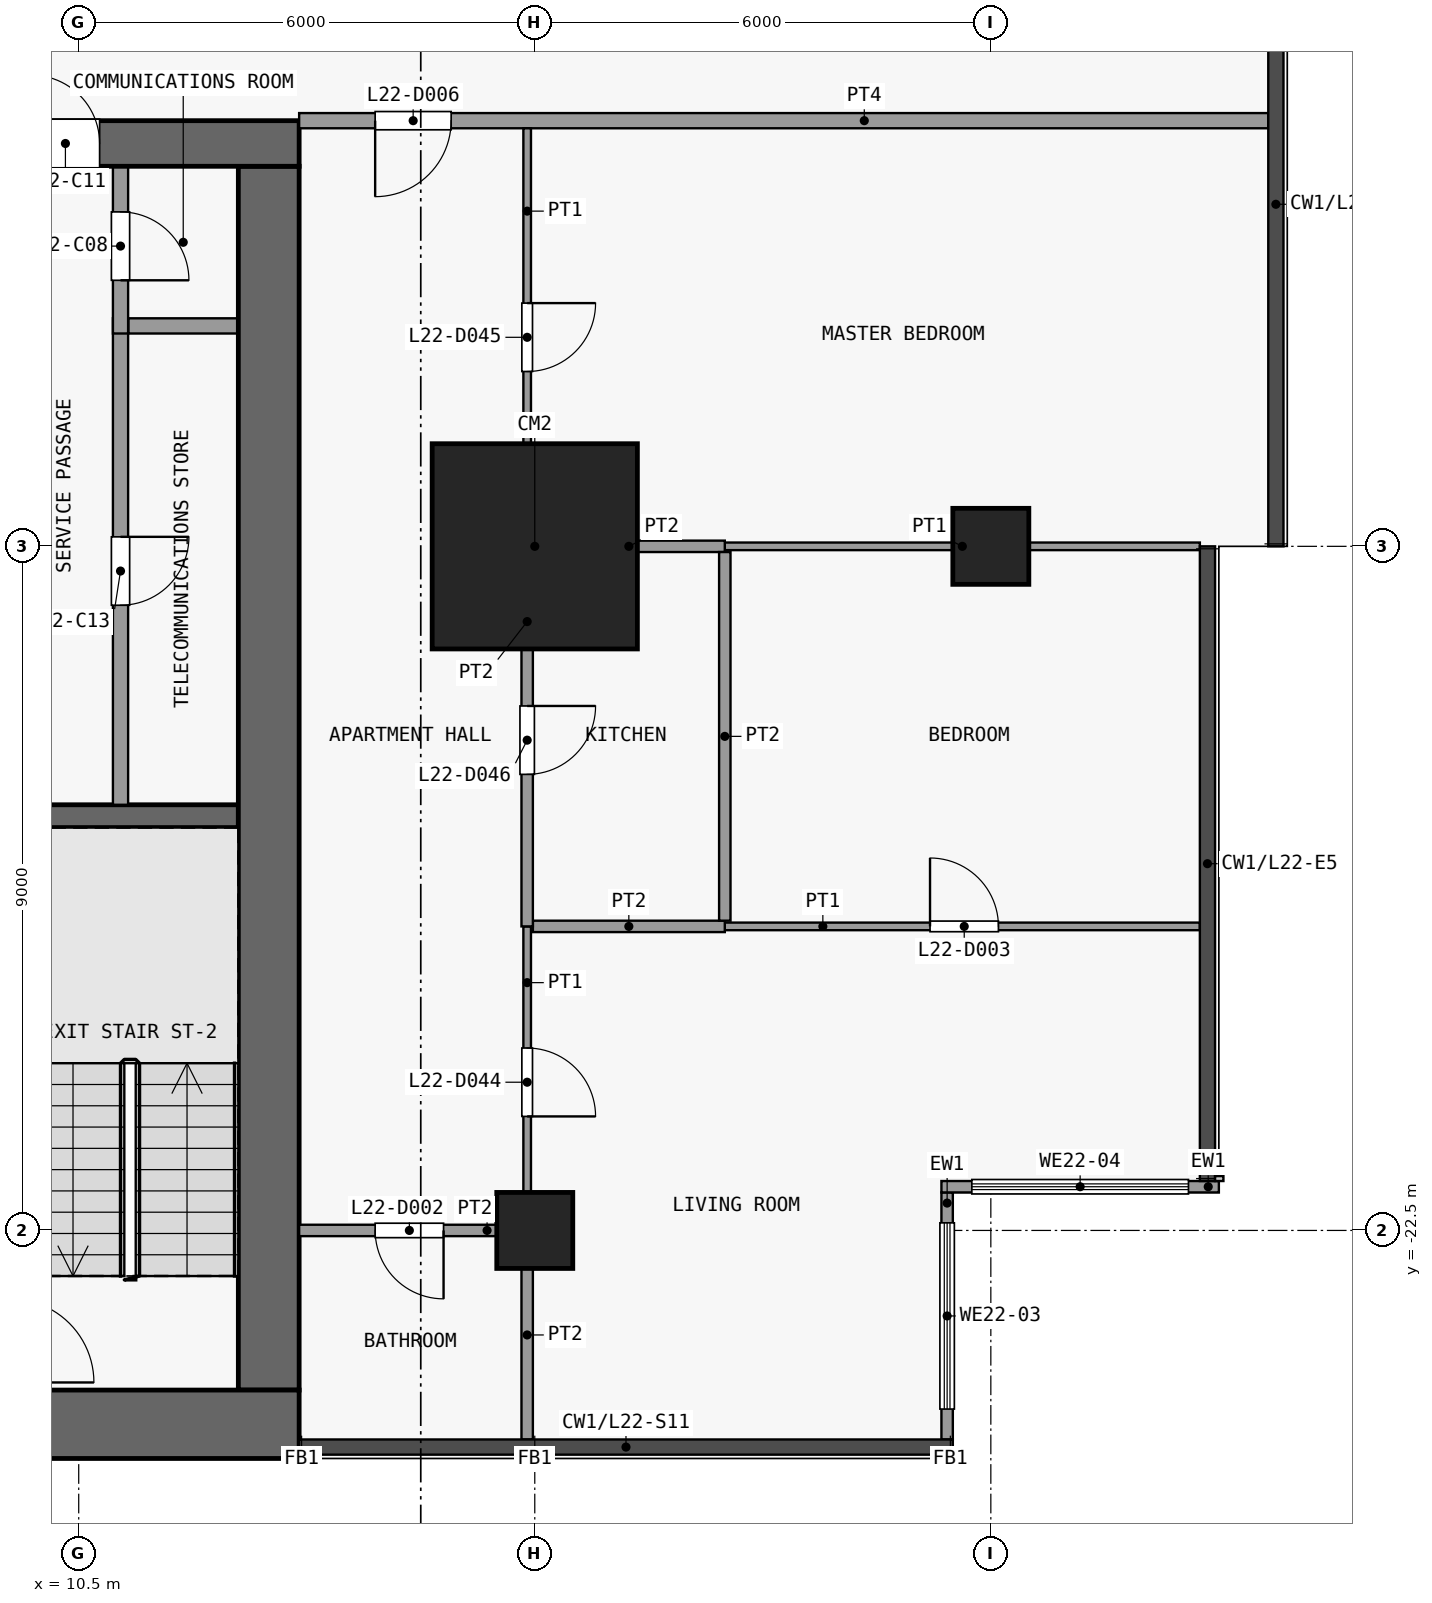
"""IFC4 building model, lengths in metres.
Left out: names, types, materials, properties, quantities, classifications, styles, units other than length and angle.
Written with IfcOpenShell. Run it as: python <this file> out.ifc"""

import sys

from ifc_helpers import new_model, si_unit, direction, frame, frame_2d, origin, origin_2d, place, context, subcontext, project, spatial, rectangle, extrude, element, fill, save


model = new_model("IFC4")
c1 = context("Model", 3, precision=1e-05, world=origin(), true_north=direction((0.0, 1.0)))
c2 = subcontext(c1, "Body", "Model", "MODEL_VIEW")
j1 = project(units=[si_unit("LENGTHUNIT", "METRE"), si_unit("PLANEANGLEUNIT", "RADIAN")], contexts=[c1])
p1 = place(None, origin())
s1 = spatial("IfcSite", under=j1, at=p1, CompositionType="ELEMENT")
p2 = place(p1, origin())
s2 = spatial("IfcBuilding", under=s1, at=p2, CompositionType="ELEMENT")
p3 = place(p2, frame((0.0, 0.0, 91.9)))
s3 = spatial("IfcBuildingStorey", under=s2, at=p3, CompositionType="ELEMENT", Elevation=91.9)
p4 = place(p3, frame((16.5, -22.5, 0.0), z_axis=(0.0, 0.0, 1.0), x_axis=(1.0, 0.0, 0.0)))
e1 = element("IfcColumn", 1, at=p4, inside=s3, PredefinedType="COLUMN", context=c2, shape_type="SweptSolid", body=[
    extrude(rectangle(XDim=1.0, YDim=1.0, at=origin_2d()), origin(), (0.0, 0.0, 1.0), 3.6),
])
p5 = place(p3, frame((16.5, -13.5, 0.0), z_axis=(0.0, 0.0, 1.0), x_axis=(1.0, 0.0, 0.0)))
e2 = element("IfcColumn", 2, at=p5, inside=s3, PredefinedType="COLUMN", context=c2, shape_type="SweptSolid", body=[
    extrude(rectangle(XDim=2.7, YDim=2.7, at=origin_2d()), origin(), (0.0, 0.0, 1.0), 3.6),
])
p6 = place(p3, frame((22.5, -13.5, 0.0), z_axis=(0.0, 0.0, 1.0), x_axis=(1.0, 0.0, 0.0)))
e3 = element("IfcColumn", 3, at=p6, inside=s3, PredefinedType="COLUMN", context=c2, shape_type="SweptSolid", body=[
    extrude(rectangle(XDim=1.0, YDim=1.0, at=origin_2d()), origin(), (0.0, 0.0, 1.0), 3.6),
])
p7 = place(p3, frame((-13.4, -25.05, 0.0), z_axis=(0.0, 0.0, 1.0), x_axis=(1.0, 0.0, 0.0)))
e4 = element("IfcWall", 4, at=p7, inside=s3, PredefinedType="SHEAR", context=c2, shape_type="SweptSolid", body=[
    extrude(rectangle(XDim=26.8, YDim=0.9, at=frame_2d((13.4, 0.0))), origin(), (0.0, 0.0, 1.0), 3.3),
])
p8 = place(p3, frame((-13.4, -8.2, 0.0), z_axis=(0.0, 0.0, 1.0), x_axis=(1.0, 0.0, 0.0)))
e5 = element("IfcWall", 5, at=p8, inside=s3, PredefinedType="SHEAR", context=c2, shape_type="SweptSolid", body=[
    extrude(rectangle(XDim=26.8, YDim=0.6, at=frame_2d((13.4, 0.0))), origin(), (0.0, 0.0, 1.0), 3.3),
])
p9 = place(p8, frame((7.7, 0.0, 0.0)))
e6 = element("IfcOpeningElement", 6, at=p9, cuts=e5, PredefinedType="OPENING", context=c2, shape_type="SweptSolid", body=[
    extrude(rectangle(XDim=1.8, YDim=2.1, at=frame_2d((0.9, 1.05))), frame((0.0, 0.31, 0.0), z_axis=(0.0, -1.0, 0.0), x_axis=(1.0, 0.0, 0.0)), (0.0, 0.0, 1.0), 0.62),
])
p10 = place(p8, frame((17.3, 0.0, 0.0)))
e7 = element("IfcOpeningElement", 7, at=p10, cuts=e5, PredefinedType="OPENING", context=c2, shape_type="SweptSolid", body=[
    extrude(rectangle(XDim=1.8, YDim=2.1, at=frame_2d((0.9, 1.05))), frame((0.0, 0.31, 0.0), z_axis=(0.0, -1.0, 0.0), x_axis=(1.0, 0.0, 0.0)), (0.0, 0.0, 1.0), 0.62),
])
p11 = place(p8, frame((2.625, 0.0, 0.0)))
e8 = element("IfcOpeningElement", 8, at=p11, cuts=e5, PredefinedType="OPENING", context=c2, shape_type="SweptSolid", body=[
    extrude(rectangle(XDim=0.9, YDim=2.1, at=frame_2d((0.45, 1.05))), frame((0.0, 0.31, 0.0), z_axis=(0.0, -1.0, 0.0), x_axis=(1.0, 0.0, 0.0)), (0.0, 0.0, 1.0), 0.62),
])
p12 = place(p8, frame((23.275, 0.0, 0.0)))
e9 = element("IfcOpeningElement", 9, at=p12, cuts=e5, PredefinedType="OPENING", context=c2, shape_type="SweptSolid", body=[
    extrude(rectangle(XDim=0.9, YDim=2.1, at=frame_2d((0.45, 1.05))), frame((0.0, 0.31, 0.0), z_axis=(0.0, -1.0, 0.0), x_axis=(1.0, 0.0, 0.0)), (0.0, 0.0, 1.0), 0.62),
])
p13 = place(p3, frame((13.0, -24.6, 0.0), z_axis=(0.0, 0.0, 1.0), x_axis=(0.0, 1.0, 0.0)))
e10 = element("IfcWall", 10, at=p13, inside=s3, PredefinedType="SHEAR", context=c2, shape_type="SweptSolid", body=[
    extrude(rectangle(XDim=16.1, YDim=0.8, at=frame_2d((8.05, 0.0))), origin(), (0.0, 0.0, 1.0), 3.3),
])
p14 = place(p3, frame((9.5, -17.05, 0.0), z_axis=(0.0, 0.0, 1.0), x_axis=(1.0, 0.0, 0.0)))
e11 = element("IfcWall", 11, at=p14, inside=s3, PredefinedType="SHEAR", context=c2, shape_type="SweptSolid", body=[
    extrude(rectangle(XDim=3.1, YDim=0.3, at=frame_2d((1.55, 0.0))), origin(), (0.0, 0.0, 1.0), 3.3),
])
p15 = place(p3, frame((11.15, -10.6, 0.0), z_axis=(0.0, 0.0, 1.0), x_axis=(1.0, 0.0, 0.0)))
e12 = element("IfcWall", 12, at=p15, inside=s3, PredefinedType="PARTITIONING", context=c2, shape_type="SweptSolid", body=[
    extrude(rectangle(XDim=1.45, YDim=0.2, at=frame_2d((0.725, 0.0))), origin(), (0.0, 0.0, 1.0), 3.3),
])
p16 = place(p3, frame((11.05, -10.5, 0.0), z_axis=(0.0, 0.0, 1.0), x_axis=(0.0, -1.0, 0.0)))
e13 = element("IfcWall", 13, at=p16, inside=s3, PredefinedType="PARTITIONING", context=c2, shape_type="SweptSolid", body=[
    extrude(rectangle(XDim=6.4, YDim=0.2, at=frame_2d((3.2, 0.0))), origin(), (0.0, 0.0, 1.0), 3.3),
])
p17 = place(p16, frame((2.875, 0.0, 0.0)))
e14 = element("IfcOpeningElement", 14, at=p17, cuts=e13, PredefinedType="OPENING", context=c2, shape_type="SweptSolid", body=[
    extrude(rectangle(XDim=0.9, YDim=2.1, at=frame_2d((0.45, 1.05))), frame((0.0, 0.11, 0.0), z_axis=(0.0, -1.0, 0.0), x_axis=(1.0, 0.0, 0.0)), (0.0, 0.0, 1.0), 0.22),
])
p18 = place(p3, frame((11.05, -8.5, 0.0), z_axis=(0.0, 0.0, 1.0), x_axis=(0.0, -1.0, 0.0)))
e15 = element("IfcWall", 15, at=p18, inside=s3, PredefinedType="PARTITIONING", context=c2, shape_type="SweptSolid", body=[
    extrude(rectangle(XDim=2.2, YDim=0.2, at=frame_2d((1.1, 0.0))), origin(), (0.0, 0.0, 1.0), 3.3),
])
p19 = place(p18, frame((0.6, 0.0, 0.0)))
e16 = element("IfcOpeningElement", 16, at=p19, cuts=e15, PredefinedType="OPENING", context=c2, shape_type="SweptSolid", body=[
    extrude(rectangle(XDim=0.9, YDim=2.1, at=frame_2d((0.45, 1.05))), frame((0.0, 0.11, 0.0), z_axis=(0.0, -1.0, 0.0), x_axis=(1.0, 0.0, 0.0)), (0.0, 0.0, 1.0), 0.22),
])
p20 = place(p3, frame((21.925, -22.0, 0.0), z_axis=(0.0, 0.0, 1.0), x_axis=(0.0, -1.0, 0.0)))
e17 = element("IfcWall", 17, at=p20, inside=s3, PredefinedType="SOLIDWALL", context=c2, shape_type="SweptSolid", body=[
    extrude(rectangle(XDim=3.25, YDim=0.15, at=frame_2d((1.625, 0.0))), origin(), (0.0, 0.0, 1.0), 3.3),
])
p21 = place(p20, frame((0.4, 0.0, 0.9)))
e18 = element("IfcOpeningElement", 18, at=p21, cuts=e17, PredefinedType="OPENING", context=c2, shape_type="SweptSolid", body=[
    extrude(rectangle(XDim=2.45, YDim=2.4, at=frame_2d((1.225, 1.2))), frame((0.0, 0.085, 0.0), z_axis=(0.0, -1.0, 0.0), x_axis=(1.0, 0.0, 0.0)), (0.0, 0.0, 1.0), 0.17),
])
p22 = place(p3, frame((25.5, -21.925, 0.0), z_axis=(0.0, 0.0, 1.0), x_axis=(-1.0, 0.0, 0.0)))
e19 = element("IfcWall", 19, at=p22, inside=s3, PredefinedType="SOLIDWALL", context=c2, shape_type="SweptSolid", body=[
    extrude(rectangle(XDim=3.65, YDim=0.15, at=frame_2d((1.825, 0.0))), origin(), (0.0, 0.0, 1.0), 3.3),
])
p23 = place(p22, frame((0.4, 0.0, 0.9)))
e20 = element("IfcOpeningElement", 20, at=p23, cuts=e19, PredefinedType="OPENING", context=c2, shape_type="SweptSolid", body=[
    extrude(rectangle(XDim=2.85, YDim=2.4, at=frame_2d((1.425, 1.2))), frame((0.0, 0.085, 0.0), z_axis=(0.0, -1.0, 0.0), x_axis=(1.0, 0.0, 0.0)), (0.0, 0.0, 1.0), 0.17),
])
p24 = place(p3, frame((13.4, -22.5, 0.0), z_axis=(0.0, 0.0, 1.0), x_axis=(1.0, 0.0, 0.0)))
e21 = element("IfcWall", 21, at=p24, inside=s3, PredefinedType="PARTITIONING", context=c2, shape_type="SweptSolid", body=[
    extrude(rectangle(XDim=2.925, YDim=0.15, at=frame_2d((1.462, 0.0))), origin(), (0.0, 0.0, 1.0), 3.3),
])
p25 = place(p24, frame((1.0, 0.0, 0.0)))
e22 = element("IfcOpeningElement", 22, at=p25, cuts=e21, PredefinedType="OPENING", context=c2, shape_type="SweptSolid", body=[
    extrude(rectangle(XDim=0.9, YDim=2.1, at=frame_2d((0.45, 1.05))), frame((0.0, 0.085, 0.0), z_axis=(0.0, -1.0, 0.0), x_axis=(1.0, 0.0, 0.0)), (0.0, 0.0, 1.0), 0.17),
])
p26 = place(p3, frame((19.0, -18.5, 0.0), z_axis=(0.0, 0.0, 1.0), x_axis=(1.0, 0.0, 0.0)))
e23 = element("IfcWall", 23, at=p26, inside=s3, PredefinedType="PARTITIONING", context=c2, shape_type="SweptSolid", body=[
    extrude(rectangle(XDim=6.25, YDim=0.1, at=frame_2d((3.125, 0.0))), origin(), (0.0, 0.0, 1.0), 3.3),
])
p27 = place(p26, frame((2.7, 0.0, 0.0)))
e24 = element("IfcOpeningElement", 24, at=p27, cuts=e23, PredefinedType="OPENING", context=c2, shape_type="SweptSolid", body=[
    extrude(rectangle(XDim=0.9, YDim=2.1, at=frame_2d((0.45, 1.05))), frame((0.0, 0.06, 0.0), z_axis=(0.0, -1.0, 0.0), x_axis=(1.0, 0.0, 0.0)), (0.0, 0.0, 1.0), 0.12),
])
p28 = place(p3, frame((16.475, -18.5, 0.0), z_axis=(0.0, 0.0, 1.0), x_axis=(1.0, 0.0, 0.0)))
e25 = element("IfcWall", 25, at=p28, inside=s3, PredefinedType="PARTITIONING", context=c2, shape_type="SweptSolid", body=[
    extrude(rectangle(XDim=2.525, YDim=0.15, at=frame_2d((1.262, 0.0))), origin(), (0.0, 0.0, 1.0), 3.3),
])
p29 = place(p3, frame((19.0, -13.5, 0.0), z_axis=(0.0, 0.0, 1.0), x_axis=(1.0, 0.0, 0.0)))
e26 = element("IfcWall", 26, at=p29, inside=s3, PredefinedType="PARTITIONING", context=c2, shape_type="SweptSolid", body=[
    extrude(rectangle(XDim=6.25, YDim=0.1, at=frame_2d((3.125, 0.0))), origin(), (0.0, 0.0, 1.0), 3.3),
])
p30 = place(p3, frame((16.475, -13.5, 0.0), z_axis=(0.0, 0.0, 1.0), x_axis=(1.0, 0.0, 0.0)))
e27 = element("IfcWall", 27, at=p30, inside=s3, PredefinedType="PARTITIONING", context=c2, shape_type="SweptSolid", body=[
    extrude(rectangle(XDim=2.525, YDim=0.15, at=frame_2d((1.262, 0.0))), origin(), (0.0, 0.0, 1.0), 3.3),
])
p31 = place(p3, frame((13.4, -7.9, 0.0), z_axis=(0.0, 0.0, 1.0), x_axis=(1.0, 0.0, 0.0)))
e28 = element("IfcWall", 28, at=p31, inside=s3, PredefinedType="PARTITIONING", context=c2, shape_type="SweptSolid", body=[
    extrude(rectangle(XDim=12.75, YDim=0.2, at=frame_2d((6.375, 0.0))), origin(), (0.0, 0.0, 1.0), 3.3),
])
p32 = place(p31, frame((1.0, 0.0, 0.0)))
e29 = element("IfcOpeningElement", 29, at=p32, cuts=e28, PredefinedType="OPENING", context=c2, shape_type="SweptSolid", body=[
    extrude(rectangle(XDim=1.0, YDim=2.1, at=frame_2d((0.5, 1.05))), frame((0.0, 0.11, 0.0), z_axis=(0.0, -1.0, 0.0), x_axis=(1.0, 0.0, 0.0)), (0.0, 0.0, 1.0), 0.22),
])
p33 = place(p3, frame((16.4, -22.5, 0.0), z_axis=(0.0, 0.0, 1.0), x_axis=(0.0, 1.0, 0.0)))
e30 = element("IfcWall", 30, at=p33, inside=s3, PredefinedType="PARTITIONING", context=c2, shape_type="SweptSolid", body=[
    extrude(rectangle(XDim=4.0, YDim=0.1, at=frame_2d((2.0, 0.0))), origin(), (0.0, 0.0, 1.0), 3.3),
])
p34 = place(p33, frame((1.5, 0.0, 0.0)))
e31 = element("IfcOpeningElement", 31, at=p34, cuts=e30, PredefinedType="OPENING", context=c2, shape_type="SweptSolid", body=[
    extrude(rectangle(XDim=0.9, YDim=2.1, at=frame_2d((0.45, 1.05))), frame((0.0, 0.06, 0.0), z_axis=(0.0, -1.0, 0.0), x_axis=(1.0, 0.0, 0.0)), (0.0, 0.0, 1.0), 0.12),
])
p35 = place(p3, frame((16.4, -13.5, 0.0), z_axis=(0.0, 0.0, 1.0), x_axis=(0.0, 1.0, 0.0)))
e32 = element("IfcWall", 32, at=p35, inside=s3, PredefinedType="PARTITIONING", context=c2, shape_type="SweptSolid", body=[
    extrude(rectangle(XDim=5.5, YDim=0.1, at=frame_2d((2.75, 0.0))), origin(), (0.0, 0.0, 1.0), 3.3),
])
p36 = place(p35, frame((2.3, 0.0, 0.0)))
e33 = element("IfcOpeningElement", 33, at=p36, cuts=e32, PredefinedType="OPENING", context=c2, shape_type="SweptSolid", body=[
    extrude(rectangle(XDim=0.9, YDim=2.1, at=frame_2d((0.45, 1.05))), frame((0.0, 0.06, 0.0), z_axis=(0.0, -1.0, 0.0), x_axis=(1.0, 0.0, 0.0)), (0.0, 0.0, 1.0), 0.12),
])
p37 = place(p3, frame((16.4, -25.25, 0.0), z_axis=(0.0, 0.0, 1.0), x_axis=(0.0, 1.0, 0.0)))
e34 = element("IfcWall", 34, at=p37, inside=s3, PredefinedType="PARTITIONING", context=c2, shape_type="SweptSolid", body=[
    extrude(rectangle(XDim=2.75, YDim=0.15, at=frame_2d((1.375, 0.0))), origin(), (0.0, 0.0, 1.0), 3.3),
])
p38 = place(p3, frame((16.4, -18.5, 0.0), z_axis=(0.0, 0.0, 1.0), x_axis=(0.0, 1.0, 0.0)))
e35 = element("IfcWall", 35, at=p38, inside=s3, PredefinedType="PARTITIONING", context=c2, shape_type="SweptSolid", body=[
    extrude(rectangle(XDim=5.0, YDim=0.15, at=frame_2d((2.5, 0.0))), origin(), (0.0, 0.0, 1.0), 3.3),
])
p39 = place(p38, frame((2.0, 0.0, 0.0)))
e36 = element("IfcOpeningElement", 36, at=p39, cuts=e35, PredefinedType="OPENING", context=c2, shape_type="SweptSolid", body=[
    extrude(rectangle(XDim=0.9, YDim=2.1, at=frame_2d((0.45, 1.05))), frame((0.0, 0.085, 0.0), z_axis=(0.0, -1.0, 0.0), x_axis=(1.0, 0.0, 0.0)), (0.0, 0.0, 1.0), 0.17),
])
p40 = place(p3, frame((19.0, -18.425, 0.0), z_axis=(0.0, 0.0, 1.0), x_axis=(0.0, 1.0, 0.0)))
e37 = element("IfcWall", 37, at=p40, inside=s3, PredefinedType="PARTITIONING", context=c2, shape_type="SweptSolid", body=[
    extrude(rectangle(XDim=4.85, YDim=0.15, at=frame_2d((2.425, 0.0))), origin(), (0.0, 0.0, 1.0), 3.3),
])
p41 = place(p19, origin())
e38 = element("IfcDoor", 38, at=p41, inside=s3, OperationType="SINGLE_SWING_RIGHT", PredefinedType="DOOR", context=c2, shape_type="SweptSolid", body=[
    extrude(rectangle(XDim=0.9, YDim=2.1, at=frame_2d((0.45, 1.05))), frame((0.0, 0.025, 0.0), z_axis=(0.0, -1.0, 0.0), x_axis=(1.0, 0.0, 0.0)), (0.0, 0.0, 1.0), 0.05),
])
fill(e16, e38)
p42 = place(p12, origin())
e39 = element("IfcDoor", 39, at=p42, inside=s3, OperationType="SINGLE_SWING_LEFT", PredefinedType="DOOR", context=c2, shape_type="SweptSolid", body=[
    extrude(rectangle(XDim=0.9, YDim=2.1, at=frame_2d((0.45, 1.05))), frame((0.0, 0.025, 0.0), z_axis=(0.0, -1.0, 0.0), x_axis=(1.0, 0.0, 0.0)), (0.0, 0.0, 1.0), 0.05),
])
fill(e9, e39)
p43 = place(p17, origin())
e40 = element("IfcDoor", 40, at=p43, inside=s3, OperationType="SINGLE_SWING_LEFT", PredefinedType="DOOR", context=c2, shape_type="SweptSolid", body=[
    extrude(rectangle(XDim=0.9, YDim=2.1, at=frame_2d((0.45, 1.05))), frame((0.0, 0.025, 0.0), z_axis=(0.0, -1.0, 0.0), x_axis=(1.0, 0.0, 0.0)), (0.0, 0.0, 1.0), 0.05),
])
fill(e14, e40)
p44 = place(p21, origin())
e41 = element("IfcWindow", 41, at=p44, inside=s3, PartitioningType="SINGLE_PANEL", PredefinedType="WINDOW", context=c2, shape_type="SweptSolid", body=[
    extrude(rectangle(XDim=2.45, YDim=2.4, at=frame_2d((1.225, 1.2))), frame((0.0, 0.03, 0.0), z_axis=(0.0, -1.0, 0.0), x_axis=(1.0, 0.0, 0.0)), (0.0, 0.0, 1.0), 0.06),
])
fill(e18, e41)
p45 = place(p23, origin())
e42 = element("IfcWindow", 42, at=p45, inside=s3, PartitioningType="SINGLE_PANEL", PredefinedType="WINDOW", context=c2, shape_type="SweptSolid", body=[
    extrude(rectangle(XDim=2.85, YDim=2.4, at=frame_2d((1.425, 1.2))), frame((0.0, 0.03, 0.0), z_axis=(0.0, -1.0, 0.0), x_axis=(1.0, 0.0, 0.0)), (0.0, 0.0, 1.0), 0.06),
])
fill(e20, e42)
p46 = place(p25, origin())
e43 = element("IfcDoor", 43, at=p46, inside=s3, OperationType="SINGLE_SWING_RIGHT", PredefinedType="DOOR", context=c2, shape_type="SweptSolid", body=[
    extrude(rectangle(XDim=0.9, YDim=2.1, at=frame_2d((0.45, 1.05))), frame((0.0, 0.025, 0.0), z_axis=(0.0, -1.0, 0.0), x_axis=(1.0, 0.0, 0.0)), (0.0, 0.0, 1.0), 0.05),
])
fill(e22, e43)
p47 = place(p27, origin())
e44 = element("IfcDoor", 44, at=p47, inside=s3, OperationType="SINGLE_SWING_RIGHT", PredefinedType="DOOR", context=c2, shape_type="SweptSolid", body=[
    extrude(rectangle(XDim=0.9, YDim=2.1, at=frame_2d((0.45, 1.05))), frame((0.0, 0.025, 0.0), z_axis=(0.0, -1.0, 0.0), x_axis=(1.0, 0.0, 0.0)), (0.0, 0.0, 1.0), 0.05),
])
fill(e24, e44)
p48 = place(p32, origin())
e45 = element("IfcDoor", 45, at=p48, inside=s3, OperationType="SINGLE_SWING_LEFT", PredefinedType="DOOR", context=c2, shape_type="SweptSolid", body=[
    extrude(rectangle(XDim=1.0, YDim=2.1, at=frame_2d((0.5, 1.05))), frame((0.0, 0.025, 0.0), z_axis=(0.0, -1.0, 0.0), x_axis=(1.0, 0.0, 0.0)), (0.0, 0.0, 1.0), 0.05),
])
fill(e29, e45)
p49 = place(p34, origin())
e46 = element("IfcDoor", 46, at=p49, inside=s3, OperationType="SINGLE_SWING_LEFT", PredefinedType="DOOR", context=c2, shape_type="SweptSolid", body=[
    extrude(rectangle(XDim=0.9, YDim=2.1, at=frame_2d((0.45, 1.05))), frame((0.0, 0.025, 0.0), z_axis=(0.0, -1.0, 0.0), x_axis=(1.0, 0.0, 0.0)), (0.0, 0.0, 1.0), 0.05),
])
fill(e31, e46)
p50 = place(p36, origin())
e47 = element("IfcDoor", 47, at=p50, inside=s3, OperationType="SINGLE_SWING_RIGHT", PredefinedType="DOOR", context=c2, shape_type="SweptSolid", body=[
    extrude(rectangle(XDim=0.9, YDim=2.1, at=frame_2d((0.45, 1.05))), frame((0.0, 0.025, 0.0), z_axis=(0.0, -1.0, 0.0), x_axis=(1.0, 0.0, 0.0)), (0.0, 0.0, 1.0), 0.05),
])
fill(e33, e47)
p51 = place(p39, origin())
e48 = element("IfcDoor", 48, at=p51, inside=s3, OperationType="SINGLE_SWING_RIGHT", PredefinedType="DOOR", context=c2, shape_type="SweptSolid", body=[
    extrude(rectangle(XDim=0.9, YDim=2.1, at=frame_2d((0.45, 1.05))), frame((0.0, 0.025, 0.0), z_axis=(0.0, -1.0, 0.0), x_axis=(1.0, 0.0, 0.0)), (0.0, 0.0, 1.0), 0.05),
])
fill(e36, e48)
save(model, sys.argv[1])
